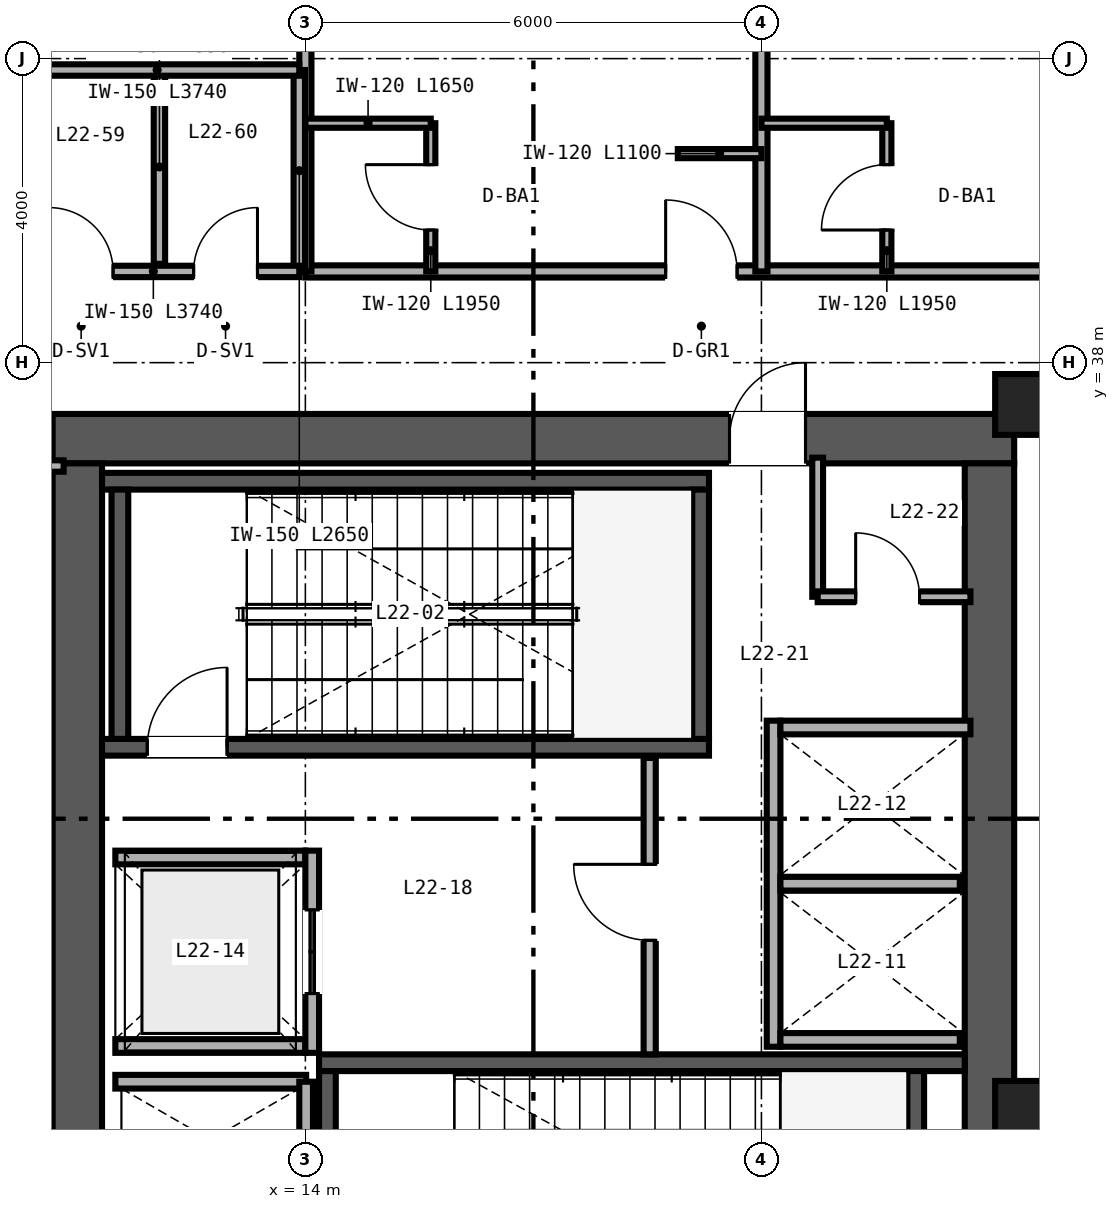
"""IFC4 building model, lengths in metres.
Left out: names, types, materials, properties, quantities, classifications, styles, units other than length and angle.
Written with IfcOpenShell. Run it as: python <this file> out.ifc"""

import sys

from ifc_helpers import new_model, si_unit, direction, frame, frame_2d, origin, origin_2d, place, context, subcontext, project, spatial, rectangle, hollow_rectangle, extrude, source, transform, mapped, element, fill, save


model = new_model("IFC4")
c1 = context("Model", 3, precision=1e-05, world=origin(), true_north=direction((0.0, 1.0)))
c2 = subcontext(c1, "Body", "Model", "MODEL_VIEW")
j1 = project(units=[si_unit("LENGTHUNIT", "METRE"), si_unit("PLANEANGLEUNIT", "RADIAN")], contexts=[c1])
p1 = place(None, origin())
s1 = spatial("IfcSite", under=j1, at=p1, CompositionType="ELEMENT")
p2 = place(p1, origin())
s2 = spatial("IfcBuilding", under=s1, at=p2, CompositionType="ELEMENT")
p3 = place(p2, frame((0.0, 0.0, 92.4)))
s3 = spatial("IfcBuildingStorey", under=s2, at=p3, CompositionType="ELEMENT", Elevation=92.4)
p4 = place(p3, frame((10.675, 37.0, 0.0), z_axis=(0.0, 0.0, 1.0), x_axis=(1.0, 0.0, 0.0)))
e1 = element("IfcWall", 1, at=p4, inside=s3, PredefinedType="SHEAR", context=c2, shape_type="SweptSolid", body=[
    extrude(rectangle(XDim=12.65, YDim=0.65, at=frame_2d((6.325, 0.0))), origin(), (0.0, 0.0, 1.0), 4.56),
])
p5 = place(p4, frame((8.905, 0.0, 0.0)))
e2 = element("IfcOpeningElement", 2, at=p5, cuts=e1, PredefinedType="OPENING", context=c2, shape_type="SweptSolid", body=[
    extrude(rectangle(XDim=1.0, YDim=2.15, at=frame_2d((0.5, 1.075))), frame((0.0, 0.335, 0.0), z_axis=(0.0, -1.0, 0.0), x_axis=(1.0, 0.0, 0.0)), (0.0, 0.0, 1.0), 0.67),
])
for number, where, z_axis, x_axis in (
    (3, (11.0, 15.325, 0.0), (0.0, 0.0, 1.0), (0.0, 1.0, 0.0)),
    (4, (23.0, 15.325, 0.0), (0.0, 0.0, 1.0), (0.0, 1.0, 0.0)),
):
    element("IfcWall", number, at=place(p3, frame(where, z_axis=z_axis, x_axis=x_axis)), inside=s3, PredefinedType="SHEAR", context=c2, shape_type="SweptSolid", body=[
        extrude(rectangle(XDim=21.35, YDim=0.65, at=frame_2d((10.675, 0.0))), origin(), (0.0, 0.0, 1.0), 4.56),
    ])
p6 = place(p3, frame((11.325, 32.94, 0.0), z_axis=(0.0, 0.0, 1.0), x_axis=(1.0, 0.0, 0.0)))
e5 = element("IfcWall", 5, at=p6, inside=s3, PredefinedType="SHEAR", context=c2, shape_type="SweptSolid", body=[
    extrude(rectangle(XDim=7.985, YDim=0.22, at=frame_2d((3.993, 0.0))), origin(), (0.0, 0.0, 1.0), 4.6),
])
p7 = place(p6, frame((0.595, 0.0, 0.0)))
e6 = element("IfcOpeningElement", 6, at=p7, cuts=e5, PredefinedType="OPENING", context=c2, shape_type="SweptSolid", body=[
    extrude(rectangle(XDim=1.05, YDim=2.15, at=frame_2d((0.525, 1.075))), frame((0.0, 0.12, 0.0), z_axis=(0.0, -1.0, 0.0), x_axis=(1.0, 0.0, 0.0)), (0.0, 0.0, 1.0), 0.24),
])
p8 = place(p3, frame((11.325, 36.44, 0.0), z_axis=(0.0, 0.0, 1.0), x_axis=(1.0, 0.0, 0.0)))
e7 = element("IfcWall", 7, at=p8, inside=s3, PredefinedType="SHEAR", context=c2, shape_type="SweptSolid", body=[
    extrude(rectangle(XDim=7.985, YDim=0.22, at=frame_2d((3.993, 0.0))), origin(), (0.0, 0.0, 1.0), 4.6),
])
for number, where, z_axis, x_axis in (
    (8, (11.56, 33.05, 0.0), (0.0, 0.0, 1.0), (0.0, 1.0, 0.0)),
    (9, (19.2, 33.05, 0.0), (0.0, 0.0, 1.0), (0.0, 1.0, 0.0)),
):
    element("IfcWall", number, at=place(p3, frame(where, z_axis=z_axis, x_axis=x_axis)), inside=s3, PredefinedType="SHEAR", context=c2, shape_type="SweptSolid", body=[
        extrude(rectangle(XDim=3.28, YDim=0.22, at=frame_2d((1.64, 0.0))), origin(), (0.0, 0.0, 1.0), 4.6),
    ])
p9 = place(p3, frame((14.18, 28.79, 0.0), z_axis=(0.0, 0.0, 1.0), x_axis=(1.0, 0.0, 0.0)))
e10 = element("IfcWall", 10, at=p9, inside=s3, PredefinedType="SHEAR", context=c2, shape_type="SweptSolid", body=[
    extrude(rectangle(XDim=8.495, YDim=0.22, at=frame_2d((4.248, 0.0))), origin(), (0.0, 0.0, 1.0), 4.6),
])
for number, where, z_axis, x_axis in (
    (11, (14.29, 25.4, 0.0), (0.0, 0.0, 1.0), (0.0, 1.0, 0.0)),
    (12, (22.03, 25.4, 0.0), (0.0, 0.0, 1.0), (0.0, 1.0, 0.0)),
):
    element("IfcWall", number, at=place(p3, frame(where, z_axis=z_axis, x_axis=x_axis)), inside=s3, PredefinedType="SHEAR", context=c2, shape_type="SweptSolid", body=[
        extrude(rectangle(XDim=3.28, YDim=0.22, at=frame_2d((1.64, 0.0))), origin(), (0.0, 0.0, 1.0), 4.6),
    ])
m1 = source(origin(), c2, "Body", "SweptSolid", [
    extrude(hollow_rectangle(XDim=0.85, YDim=0.8, WallThickness=0.032, at=origin_2d()), origin(), (0.0, 0.0, 1.0), 4.56),
])
for number, where, z_axis, x_axis in (
    (13, (23.5, 28.15, 0.0), (0.0, 0.0, 1.0), (1.0, 0.0, 0.0)),
    (14, (23.5, 37.45, 0.0), (0.0, 0.0, 1.0), (1.0, 0.0, 0.0)),
):
    element("IfcColumn", number, at=place(p3, frame(where, z_axis=z_axis, x_axis=x_axis)), inside=s3, PredefinedType="COLUMN", context=c2, shape_type="MappedRepresentation", body=[
        mapped(m1, transform((0.0, 0.0, 0.0), scale=1.0)),
    ])
p10 = place(p3, frame((20.16, 29.0, 0.0), z_axis=(0.0, 0.0, 1.0), x_axis=(0.0, 1.0, 0.0)))
e15 = element("IfcWall", 15, at=p10, inside=s3, PredefinedType="SOLIDWALL", context=c2, shape_type="SweptSolid", body=[
    extrude(rectangle(XDim=4.29, YDim=0.18, at=frame_2d((2.145, 0.0))), origin(), (0.0, 0.0, 1.0), 4.56),
])
p11 = place(p3, frame((20.25, 29.09, 0.0), z_axis=(0.0, 0.0, 1.0), x_axis=(1.0, 0.0, 0.0)))
e16 = element("IfcWall", 16, at=p11, inside=s3, PredefinedType="SOLIDWALL", context=c2, shape_type="SweptSolid", body=[
    extrude(rectangle(XDim=2.36, YDim=0.18, at=frame_2d((1.18, 0.0))), origin(), (0.0, 0.0, 1.0), 4.56),
])
p12 = place(p3, frame((20.25, 33.2, 0.0), z_axis=(0.0, 0.0, 1.0), x_axis=(1.0, 0.0, 0.0)))
e17 = element("IfcWall", 17, at=p12, inside=s3, PredefinedType="SOLIDWALL", context=c2, shape_type="SweptSolid", body=[
    extrude(rectangle(XDim=2.5, YDim=0.18, at=frame_2d((1.25, 0.0))), origin(), (0.0, 0.0, 1.0), 4.56),
])
p13 = place(p3, frame((20.25, 31.145, 0.0), z_axis=(0.0, 0.0, 1.0), x_axis=(1.0, 0.0, 0.0)))
e18 = element("IfcWall", 18, at=p13, inside=s3, PredefinedType="SOLIDWALL", context=c2, shape_type="SweptSolid", body=[
    extrude(rectangle(XDim=2.36, YDim=0.18, at=frame_2d((1.18, 0.0))), origin(), (0.0, 0.0, 1.0), 4.56),
])
for number, where, z_axis, x_axis in (
    (19, (11.5, 29.01, 0.0), (0.0, 0.0, 1.0), (1.0, 0.0, 0.0)),
    (20, (11.5, 31.49, 0.0), (0.0, 0.0, 1.0), (1.0, 0.0, 0.0)),
):
    element("IfcWall", number, at=place(p3, frame(where, z_axis=z_axis, x_axis=x_axis)), inside=s3, PredefinedType="SOLIDWALL", context=c2, shape_type="SweptSolid", body=[
        extrude(rectangle(XDim=2.5, YDim=0.18, at=frame_2d((1.25, 0.0))), origin(), (0.0, 0.0, 1.0), 4.56),
    ])
p14 = place(p3, frame((14.09, 28.92, 0.0), z_axis=(0.0, 0.0, 1.0), x_axis=(0.0, 1.0, 0.0)))
e21 = element("IfcWall", 21, at=p14, inside=s3, PredefinedType="SOLIDWALL", context=c2, shape_type="SweptSolid", body=[
    extrude(rectangle(XDim=2.66, YDim=0.18, at=frame_2d((1.33, 0.0))), origin(), (0.0, 0.0, 1.0), 4.56),
])
p15 = place(p14, frame((0.78, 0.0, 0.0)))
e22 = element("IfcOpeningElement", 22, at=p15, cuts=e21, PredefinedType="OPENING", context=c2, shape_type="SweptSolid", body=[
    extrude(rectangle(XDim=1.1, YDim=2.2, at=frame_2d((0.55, 1.1))), frame((0.0, 0.1, 0.0), z_axis=(0.0, -1.0, 0.0), x_axis=(1.0, 0.0, 0.0)), (0.0, 0.0, 1.0), 0.2),
])
p16 = place(p3, frame((11.5, 28.54, 0.0), z_axis=(0.0, 0.0, 1.0), x_axis=(1.0, 0.0, 0.0)))
e23 = element("IfcWall", 23, at=p16, inside=s3, PredefinedType="SOLIDWALL", context=c2, shape_type="SweptSolid", body=[
    extrude(rectangle(XDim=2.51, YDim=0.18, at=frame_2d((1.255, 0.0))), origin(), (0.0, 0.0, 1.0), 4.56),
])
p17 = place(p3, frame((14.01, 25.46, 0.0), z_axis=(0.0, 0.0, 1.0), x_axis=(0.0, 1.0, 0.0)))
e24 = element("IfcWall", 24, at=p17, inside=s3, PredefinedType="SOLIDWALL", context=c2, shape_type="SweptSolid", body=[
    extrude(rectangle(XDim=3.08, YDim=0.18, at=frame_2d((1.54, 0.0))), origin(), (0.0, 0.0, 1.0), 4.56),
])
p18 = place(p3, frame((18.53, 28.9, 0.0), z_axis=(0.0, 0.0, 1.0), x_axis=(0.0, 1.0, 0.0)))
e25 = element("IfcWall", 25, at=p18, inside=s3, PredefinedType="PARTITIONING", context=c2, shape_type="SweptSolid", body=[
    extrude(rectangle(XDim=3.9, YDim=0.16, at=frame_2d((1.95, 0.0))), origin(), (0.0, 0.0, 1.0), 4.56),
])
p19 = place(p18, frame((1.5, 0.0, 0.0)))
e26 = element("IfcOpeningElement", 26, at=p19, cuts=e25, PredefinedType="OPENING", context=c2, shape_type="SweptSolid", body=[
    extrude(rectangle(XDim=1.0, YDim=2.15, at=frame_2d((0.5, 1.075))), frame((0.0, 0.09, 0.0), z_axis=(0.0, -1.0, 0.0), x_axis=(1.0, 0.0, 0.0)), (0.0, 0.0, 1.0), 0.18),
])
p20 = place(p3, frame((20.74, 34.92, 0.0), z_axis=(0.0, 0.0, 1.0), x_axis=(0.0, 1.0, 0.0)))
e27 = element("IfcWall", 27, at=p20, inside=s3, PredefinedType="PARTITIONING", context=c2, shape_type="SweptSolid", body=[
    extrude(rectangle(XDim=1.83, YDim=0.142, at=frame_2d((0.915, 0.0))), origin(), (0.0, 0.0, 1.0), 4.56),
])
p21 = place(p3, frame((20.74, 34.92, 0.0), z_axis=(0.0, 0.0, 1.0), x_axis=(1.0, 0.0, 0.0)))
e28 = element("IfcWall", 28, at=p21, inside=s3, PredefinedType="PARTITIONING", context=c2, shape_type="SweptSolid", body=[
    extrude(rectangle(XDim=2.01, YDim=0.142, at=frame_2d((1.005, 0.0))), origin(), (0.0, 0.0, 1.0), 4.56),
])
p22 = place(p21, frame((0.5, 0.0, 0.0)))
e29 = element("IfcOpeningElement", 29, at=p22, cuts=e28, PredefinedType="OPENING", context=c2, shape_type="SweptSolid", body=[
    extrude(rectangle(XDim=0.84, YDim=2.1, at=frame_2d((0.42, 1.05))), frame((0.0, 0.081, 0.0), z_axis=(0.0, -1.0, 0.0), x_axis=(1.0, 0.0, 0.0)), (0.0, 0.0, 1.0), 0.162),
])
p23 = place(p3, frame((14.0, 39.2, 0.0), z_axis=(0.0, 0.0, 1.0), x_axis=(1.0, 0.0, 0.0)))
e30 = element("IfcWall", 30, at=p23, inside=s3, PredefinedType="PARTITIONING", context=c2, shape_type="SweptSolid", body=[
    extrude(rectangle(XDim=36.0, YDim=0.16, at=frame_2d((18.0, 0.0))), origin(), (0.0, 0.0, 1.0), 3.781),
])
p24 = place(p23, frame((4.74, 0.0, 0.0)))
e31 = element("IfcOpeningElement", 31, at=p24, cuts=e30, PredefinedType="OPENING", context=c2, shape_type="SweptSolid", body=[
    extrude(rectangle(XDim=0.94, YDim=2.15, at=frame_2d((0.47, 1.075))), frame((0.0, 0.09, 0.0), z_axis=(0.0, -1.0, 0.0), x_axis=(1.0, 0.0, 0.0)), (0.0, 0.0, 1.0), 0.18),
])
p25 = place(p23, frame((10.74, 0.0, 0.0)))
e32 = element("IfcOpeningElement", 32, at=p25, cuts=e30, PredefinedType="OPENING", context=c2, shape_type="SweptSolid", body=[
    extrude(rectangle(XDim=0.94, YDim=2.15, at=frame_2d((0.47, 1.075))), frame((0.0, 0.09, 0.0), z_axis=(0.0, -1.0, 0.0), x_axis=(1.0, 0.0, 0.0)), (0.0, 0.0, 1.0), 0.18),
])
p26 = place(p23, frame((14.77, 0.0, 0.0)))
e33 = element("IfcOpeningElement", 33, at=p26, cuts=e30, PredefinedType="OPENING", context=c2, shape_type="SweptSolid", body=[
    extrude(rectangle(XDim=0.96, YDim=2.15, at=frame_2d((0.48, 1.075))), frame((0.0, 0.09, 0.0), z_axis=(0.0, -1.0, 0.0), x_axis=(1.0, 0.0, 0.0)), (0.0, 0.0, 1.0), 0.18),
])
p27 = place(p23, frame((23.74, 0.0, 0.0)))
e34 = element("IfcOpeningElement", 34, at=p27, cuts=e30, PredefinedType="OPENING", context=c2, shape_type="SweptSolid", body=[
    extrude(rectangle(XDim=0.94, YDim=2.15, at=frame_2d((0.47, 1.075))), frame((0.0, 0.09, 0.0), z_axis=(0.0, -1.0, 0.0), x_axis=(1.0, 0.0, 0.0)), (0.0, 0.0, 1.0), 0.18),
])
p28 = place(p23, frame((29.24, 0.0, 0.0)))
e35 = element("IfcOpeningElement", 35, at=p28, cuts=e30, PredefinedType="OPENING", context=c2, shape_type="SweptSolid", body=[
    extrude(rectangle(XDim=0.94, YDim=2.15, at=frame_2d((0.47, 1.075))), frame((0.0, 0.09, 0.0), z_axis=(0.0, -1.0, 0.0), x_axis=(1.0, 0.0, 0.0)), (0.0, 0.0, 1.0), 0.18),
])
p29 = place(p23, frame((34.74, 0.0, 0.0)))
e36 = element("IfcOpeningElement", 36, at=p29, cuts=e30, PredefinedType="OPENING", context=c2, shape_type="SweptSolid", body=[
    extrude(rectangle(XDim=0.94, YDim=2.15, at=frame_2d((0.47, 1.075))), frame((0.0, 0.09, 0.0), z_axis=(0.0, -1.0, 0.0), x_axis=(1.0, 0.0, 0.0)), (0.0, 0.0, 1.0), 0.18),
])
for number, where, z_axis, x_axis in (
    (37, (14.0, 39.2, 0.0), (0.0, 0.0, 1.0), (0.0, 1.0, 0.0)),
    (38, (20.0, 39.2, 0.0), (0.0, 0.0, 1.0), (0.0, 1.0, 0.0)),
):
    element("IfcWall", number, at=place(p3, frame(where, z_axis=z_axis, x_axis=x_axis)), inside=s3, PredefinedType="PARTITIONING", context=c2, shape_type="SweptSolid", body=[
        extrude(rectangle(XDim=10.44, YDim=0.16, at=frame_2d((5.22, 0.0))), origin(), (0.0, 0.0, 1.0), 3.867),
    ])
p30 = place(p3, frame((15.65, 39.2, 0.0), z_axis=(0.0, 0.0, 1.0), x_axis=(0.0, 1.0, 0.0)))
e39 = element("IfcWall", 39, at=p30, inside=s3, PredefinedType="PARTITIONING", context=c2, shape_type="SweptSolid", body=[
    extrude(rectangle(XDim=1.95, YDim=0.12, at=frame_2d((0.975, 0.0))), origin(), (0.0, 0.0, 1.0), 4.56),
])
p31 = place(p30, frame((0.545, 0.0, 0.0)))
e40 = element("IfcOpeningElement", 40, at=p31, cuts=e39, PredefinedType="OPENING", context=c2, shape_type="SweptSolid", body=[
    extrude(rectangle(XDim=0.86, YDim=2.1, at=frame_2d((0.43, 1.05))), frame((0.0, 0.07, 0.0), z_axis=(0.0, -1.0, 0.0), x_axis=(1.0, 0.0, 0.0)), (0.0, 0.0, 1.0), 0.14),
])
p32 = place(p3, frame((14.0, 41.15, 0.0), z_axis=(0.0, 0.0, 1.0), x_axis=(1.0, 0.0, 0.0)))
e41 = element("IfcWall", 41, at=p32, inside=s3, PredefinedType="PARTITIONING", context=c2, shape_type="SweptSolid", body=[
    extrude(rectangle(XDim=1.65, YDim=0.12, at=frame_2d((0.825, 0.0))), origin(), (0.0, 0.0, 1.0), 4.56),
])
p33 = place(p3, frame((18.9, 40.75, 0.0), z_axis=(0.0, 0.0, 1.0), x_axis=(1.0, 0.0, 0.0)))
e42 = element("IfcWall", 42, at=p33, inside=s3, PredefinedType="PARTITIONING", context=c2, shape_type="SweptSolid", body=[
    extrude(rectangle(XDim=1.1, YDim=0.12, at=frame_2d((0.55, 0.0))), origin(), (0.0, 0.0, 1.0), 4.56),
])
p34 = place(p3, frame((21.65, 39.2, 0.0), z_axis=(0.0, 0.0, 1.0), x_axis=(0.0, 1.0, 0.0)))
e43 = element("IfcWall", 43, at=p34, inside=s3, PredefinedType="PARTITIONING", context=c2, shape_type="SweptSolid", body=[
    extrude(rectangle(XDim=1.95, YDim=0.12, at=frame_2d((0.975, 0.0))), origin(), (0.0, 0.0, 1.0), 4.56),
])
p35 = place(p34, frame((0.545, 0.0, 0.0)))
e44 = element("IfcOpeningElement", 44, at=p35, cuts=e43, PredefinedType="OPENING", context=c2, shape_type="SweptSolid", body=[
    extrude(rectangle(XDim=0.86, YDim=2.1, at=frame_2d((0.43, 1.05))), frame((0.0, 0.07, 0.0), z_axis=(0.0, -1.0, 0.0), x_axis=(1.0, 0.0, 0.0)), (0.0, 0.0, 1.0), 0.14),
])
p36 = place(p3, frame((20.0, 41.15, 0.0), z_axis=(0.0, 0.0, 1.0), x_axis=(1.0, 0.0, 0.0)))
e45 = element("IfcWall", 45, at=p36, inside=s3, PredefinedType="PARTITIONING", context=c2, shape_type="SweptSolid", body=[
    extrude(rectangle(XDim=1.65, YDim=0.12, at=frame_2d((0.825, 0.0))), origin(), (0.0, 0.0, 1.0), 4.56),
])
p37 = place(p3, frame((8.16, 36.64, 0.0), z_axis=(0.0, 0.0, 1.0), x_axis=(1.0, 0.0, 0.0)))
e46 = element("IfcWall", 46, at=p37, inside=s3, PredefinedType="PARTITIONING", context=c2, shape_type="SweptSolid", body=[
    extrude(rectangle(XDim=2.66, YDim=0.15, at=frame_2d((1.33, 0.0))), origin(), (0.0, 0.0, 1.0), 3.943),
])
p38 = place(p37, frame((1.58, 0.0, 0.0)))
e47 = element("IfcOpeningElement", 47, at=p38, cuts=e46, PredefinedType="OPENING", context=c2, shape_type="SweptSolid", body=[
    extrude(rectangle(XDim=0.88, YDim=2.15, at=frame_2d((0.44, 1.075))), frame((0.0, 0.085, 0.0), z_axis=(0.0, -1.0, 0.0), x_axis=(1.0, 0.0, 0.0)), (0.0, 0.0, 1.0), 0.17),
])
p39 = place(p3, frame((12.08, 39.3, 0.0), z_axis=(0.0, 0.0, 1.0), x_axis=(0.0, 1.0, 0.0)))
e48 = element("IfcWall", 48, at=p39, inside=s3, PredefinedType="PARTITIONING", context=c2, shape_type="SweptSolid", body=[
    extrude(rectangle(XDim=2.55, YDim=0.15, at=frame_2d((1.275, 0.0))), origin(), (0.0, 0.0, 1.0), 4.56),
])
p40 = place(p3, frame((13.92, 39.2, 0.0), z_axis=(0.0, 0.0, 1.0), x_axis=(0.0, 1.0, 0.0)))
e49 = element("IfcWall", 49, at=p40, inside=s3, PredefinedType="PARTITIONING", context=c2, shape_type="SweptSolid", body=[
    extrude(rectangle(XDim=2.65, YDim=0.15, at=frame_2d((1.325, 0.0))), origin(), (0.0, 0.0, 1.0), 4.56),
])
p41 = place(p3, frame((10.18, 41.85, 0.0), z_axis=(0.0, 0.0, 1.0), x_axis=(1.0, 0.0, 0.0)))
e50 = element("IfcWall", 50, at=p41, inside=s3, PredefinedType="PARTITIONING", context=c2, shape_type="SweptSolid", body=[
    extrude(rectangle(XDim=3.74, YDim=0.15, at=frame_2d((1.87, 0.0))), origin(), (0.0, 0.0, 1.0), 4.56),
])
p42 = place(p3, frame((10.18, 39.2, 0.0), z_axis=(0.0, 0.0, 1.0), x_axis=(1.0, 0.0, 0.0)))
e51 = element("IfcWall", 51, at=p42, inside=s3, PredefinedType="PARTITIONING", context=c2, shape_type="SweptSolid", body=[
    extrude(rectangle(XDim=3.74, YDim=0.15, at=frame_2d((1.87, 0.0))), origin(), (0.0, 0.0, 1.0), 4.56),
])
p43 = place(p42, frame((0.45, 0.0, 0.0)))
e52 = element("IfcOpeningElement", 52, at=p43, cuts=e51, PredefinedType="OPENING", context=c2, shape_type="SweptSolid", body=[
    extrude(rectangle(XDim=0.84, YDim=2.1, at=frame_2d((0.42, 1.05))), frame((0.0, 0.085, 0.0), z_axis=(0.0, -1.0, 0.0), x_axis=(1.0, 0.0, 0.0)), (0.0, 0.0, 1.0), 0.17),
])
p44 = place(p42, frame((2.35, 0.0, 0.0)))
e53 = element("IfcOpeningElement", 53, at=p44, cuts=e51, PredefinedType="OPENING", context=c2, shape_type="SweptSolid", body=[
    extrude(rectangle(XDim=0.84, YDim=2.1, at=frame_2d((0.42, 1.05))), frame((0.0, 0.085, 0.0), z_axis=(0.0, -1.0, 0.0), x_axis=(1.0, 0.0, 0.0)), (0.0, 0.0, 1.0), 0.17),
])
m2 = source(origin(), c2, "Body", "SweptSolid", [
    extrude(rectangle(XDim=1.05, YDim=2.15, at=frame_2d((0.525, 1.075))), frame((0.0, 0.025, 0.0), z_axis=(0.0, -1.0, 0.0), x_axis=(1.0, 0.0, 0.0)), (0.0, 0.0, 1.0), 0.05),
])
p45 = place(p7, origin())
e54 = element("IfcDoor", 54, at=p45, inside=s3, OperationType="SINGLE_SWING_RIGHT", PredefinedType="DOOR", context=c2, shape_type="MappedRepresentation", body=[
    mapped(m2, transform((0.0, 0.0, 0.0), scale=1.0)),
])
fill(e6, e54)
m3 = source(origin(), c2, "Body", "SweptSolid", [
    extrude(rectangle(XDim=1.1, YDim=2.2, at=frame_2d((0.55, 1.1))), frame((0.0, 0.025, 0.0), z_axis=(0.0, -1.0, 0.0), x_axis=(1.0, 0.0, 0.0)), (0.0, 0.0, 1.0), 0.05),
])
p46 = place(p15, origin())
e55 = element("IfcDoor", 55, at=p46, inside=s3, OperationType="DOUBLE_DOOR_SLIDING", PredefinedType="DOOR", context=c2, shape_type="MappedRepresentation", body=[
    mapped(m3, transform((0.0, 0.0, 0.0), scale=1.0)),
])
fill(e22, e55)
m4 = source(origin(), c2, "Body", "SweptSolid", [
    extrude(rectangle(XDim=1.0, YDim=2.15, at=frame_2d((0.5, 1.075))), frame((0.0, 0.025, 0.0), z_axis=(0.0, -1.0, 0.0), x_axis=(1.0, 0.0, 0.0)), (0.0, 0.0, 1.0), 0.05),
])
p47 = place(p19, origin())
e56 = element("IfcDoor", 56, at=p47, inside=s3, OperationType="SINGLE_SWING_RIGHT", PredefinedType="DOOR", context=c2, shape_type="MappedRepresentation", body=[
    mapped(m4, transform((0.0, 0.0, 0.0), scale=1.0)),
])
fill(e26, e56)
m5 = source(origin(), c2, "Body", "SweptSolid", [
    extrude(rectangle(XDim=0.84, YDim=2.1, at=frame_2d((0.42, 1.05))), frame((0.0, 0.025, 0.0), z_axis=(0.0, -1.0, 0.0), x_axis=(1.0, 0.0, 0.0)), (0.0, 0.0, 1.0), 0.05),
])
p48 = place(p22, origin())
e57 = element("IfcDoor", 57, at=p48, inside=s3, OperationType="SINGLE_SWING_LEFT", PredefinedType="DOOR", context=c2, shape_type="MappedRepresentation", body=[
    mapped(m5, transform((0.0, 0.0, 0.0), scale=1.0)),
])
fill(e29, e57)
p49 = place(p5, origin())
e58 = element("IfcDoor", 58, at=p49, inside=s3, OperationType="SINGLE_SWING_RIGHT", PredefinedType="DOOR", context=c2, shape_type="MappedRepresentation", body=[
    mapped(m4, transform((0.0, 0.0, 0.0), scale=1.0)),
])
fill(e2, e58)
m6 = source(origin(), c2, "Body", "SweptSolid", [
    extrude(rectangle(XDim=0.86, YDim=2.1, at=frame_2d((0.43, 1.05))), frame((0.0, 0.025, 0.0), z_axis=(0.0, -1.0, 0.0), x_axis=(1.0, 0.0, 0.0)), (0.0, 0.0, 1.0), 0.05),
])
p50 = place(p31, origin())
e59 = element("IfcDoor", 59, at=p50, inside=s3, OperationType="SINGLE_SWING_RIGHT", PredefinedType="DOOR", context=c2, shape_type="MappedRepresentation", body=[
    mapped(m6, transform((0.0, 0.0, 0.0), scale=1.0)),
])
fill(e40, e59)
p51 = place(p35, origin())
e60 = element("IfcDoor", 60, at=p51, inside=s3, OperationType="SINGLE_SWING_LEFT", PredefinedType="DOOR", context=c2, shape_type="MappedRepresentation", body=[
    mapped(m6, transform((0.0, 0.0, 0.0), scale=1.0)),
])
fill(e44, e60)
m7 = source(origin(), c2, "Body", "SweptSolid", [
    extrude(rectangle(XDim=0.94, YDim=2.15, at=frame_2d((0.47, 1.075))), frame((0.0, 0.025, 0.0), z_axis=(0.0, -1.0, 0.0), x_axis=(1.0, 0.0, 0.0)), (0.0, 0.0, 1.0), 0.05),
])
p52 = place(p24, origin())
e61 = element("IfcDoor", 61, at=p52, inside=s3, OperationType="SINGLE_SWING_LEFT", PredefinedType="DOOR", context=c2, shape_type="MappedRepresentation", body=[
    mapped(m7, transform((0.0, 0.0, 0.0), scale=1.0)),
])
fill(e31, e61)
p53 = place(p43, origin())
e62 = element("IfcDoor", 62, at=p53, inside=s3, OperationType="SINGLE_SWING_LEFT", PredefinedType="DOOR", context=c2, shape_type="MappedRepresentation", body=[
    mapped(m5, transform((0.0, 0.0, 0.0), scale=1.0)),
])
fill(e52, e62)
p54 = place(p44, origin())
e63 = element("IfcDoor", 63, at=p54, inside=s3, OperationType="SINGLE_SWING_RIGHT", PredefinedType="DOOR", context=c2, shape_type="MappedRepresentation", body=[
    mapped(m5, transform((0.0, 0.0, 0.0), scale=1.0)),
])
fill(e53, e63)
save(model, sys.argv[1])
